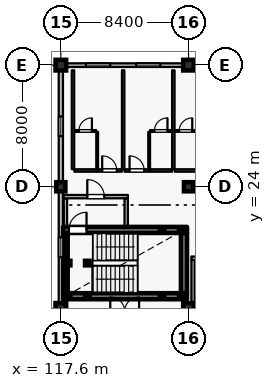
"""IFC4 building model, lengths in metres.
Left out: names, types, materials, properties, quantities, classifications, styles, units other than length and angle.
Written with IfcOpenShell. Run it as: python <this file> out.ifc"""

import sys

from ifc_helpers import new_model, si_unit, direction, frame, frame_2d, origin, origin_2d, place, context, subcontext, project, spatial, rectangle, hollow_rectangle, extrude, element, fill, save


model = new_model("IFC4")
c1 = context("Model", 3, precision=1e-05, world=origin(), true_north=direction((0.0, 1.0)))
c2 = subcontext(c1, "Body", "Model", "MODEL_VIEW")
j1 = project(units=[si_unit("LENGTHUNIT", "METRE"), si_unit("PLANEANGLEUNIT", "RADIAN")], contexts=[c1])
p1 = place(None, origin())
s1 = spatial("IfcSite", under=j1, at=p1, CompositionType="ELEMENT")
p2 = place(p1, origin())
s2 = spatial("IfcBuilding", under=s1, at=p2, CompositionType="ELEMENT")
p3 = place(p2, frame((0.0, 0.0, 32.4)))
s3 = spatial("IfcBuildingStorey", under=s2, at=p3, CompositionType="ELEMENT", Elevation=32.4)
for number, where, z_axis, x_axis in (
    (1, (117.6, 16.0, 0.0), (0.0, 0.0, 1.0), (1.0, 0.0, 0.0)),
    (2, (117.6, 32.0, 0.0), (0.0, 0.0, 1.0), (1.0, 0.0, 0.0)),
    (3, (126.0, 16.0, 0.0), (0.0, 0.0, 1.0), (1.0, 0.0, 0.0)),
    (4, (126.0, 32.0, 0.0), (0.0, 0.0, 1.0), (1.0, 0.0, 0.0)),
):
    element("IfcColumn", number, at=place(p3, frame(where, z_axis=z_axis, x_axis=x_axis)), inside=s3, PredefinedType="COLUMN", context=c2, shape_type="SweptSolid", body=[
        extrude(rectangle(XDim=0.7, YDim=0.7, at=origin_2d()), origin(), (0.0, 0.0, 1.0), 3.6),
    ])
for number, where, z_axis, x_axis in (
    (5, (117.6, 24.0, 0.0), (0.0, 0.0, 1.0), (1.0, 0.0, 0.0)),
    (6, (126.0, 24.0, 0.0), (0.0, 0.0, 1.0), (1.0, 0.0, 0.0)),
):
    element("IfcColumn", number, at=place(p3, frame(where, z_axis=z_axis, x_axis=x_axis)), inside=s3, PredefinedType="COLUMN", context=c2, shape_type="SweptSolid", body=[
        extrude(rectangle(XDim=0.6, YDim=0.6, at=origin_2d()), origin(), (0.0, 0.0, 1.0), 3.6),
    ])
p4 = place(p3, frame((117.95, 32.0, 0.0), z_axis=(0.0, 0.0, 1.0), x_axis=(1.0, 0.0, 0.0)))
e7 = element("IfcWall", 7, at=p4, inside=s3, PredefinedType="SOLIDWALL", context=c2, shape_type="SweptSolid", body=[
    extrude(rectangle(XDim=7.7, YDim=0.24, at=frame_2d((3.85, 0.0))), origin(), (0.0, 0.0, 1.0), 2.94),
])
p5 = place(p4, frame((1.3, 0.0, 0.8)))
e8 = element("IfcOpeningElement", 8, at=p5, cuts=e7, PredefinedType="OPENING", context=c2, shape_type="SweptSolid", body=[
    extrude(rectangle(XDim=1.6, YDim=1.6, at=frame_2d((0.8, 0.8))), frame((0.0, 0.13, 0.0), z_axis=(0.0, -1.0, 0.0), x_axis=(1.0, 0.0, 0.0)), (0.0, 0.0, 1.0), 0.26),
])
p6 = place(p4, frame((4.6, 0.0, 0.8)))
e9 = element("IfcOpeningElement", 9, at=p6, cuts=e7, PredefinedType="OPENING", context=c2, shape_type="SweptSolid", body=[
    extrude(rectangle(XDim=1.6, YDim=1.6, at=frame_2d((0.8, 0.8))), frame((0.0, 0.13, 0.0), z_axis=(0.0, -1.0, 0.0), x_axis=(1.0, 0.0, 0.0)), (0.0, 0.0, 1.0), 0.26),
])
p7 = place(p3, frame((126.35, 32.0, 0.0), z_axis=(0.0, 0.0, 1.0), x_axis=(1.0, 0.0, 0.0)))
e10 = element("IfcWall", 10, at=p7, inside=s3, PredefinedType="SOLIDWALL", context=c2, shape_type="SweptSolid", body=[
    extrude(rectangle(XDim=7.7, YDim=0.24, at=frame_2d((3.85, 0.0))), origin(), (0.0, 0.0, 1.0), 2.94),
])
p8 = place(p7, frame((0.125, 0.0, 0.8)))
e11 = element("IfcOpeningElement", 11, at=p8, cuts=e10, PredefinedType="OPENING", context=c2, shape_type="SweptSolid", body=[
    extrude(rectangle(XDim=1.6, YDim=1.6, at=frame_2d((0.8, 0.8))), frame((0.0, 0.13, 0.0), z_axis=(0.0, -1.0, 0.0), x_axis=(1.0, 0.0, 0.0)), (0.0, 0.0, 1.0), 0.26),
])
p9 = place(p7, frame((2.8, 0.0, 0.8)))
e12 = element("IfcOpeningElement", 12, at=p9, cuts=e10, PredefinedType="OPENING", context=c2, shape_type="SweptSolid", body=[
    extrude(rectangle(XDim=1.6, YDim=1.6, at=frame_2d((0.8, 0.8))), frame((0.0, 0.13, 0.0), z_axis=(0.0, -1.0, 0.0), x_axis=(1.0, 0.0, 0.0)), (0.0, 0.0, 1.0), 0.26),
])
p10 = place(p7, frame((5.725, 0.0, 0.8)))
e13 = element("IfcOpeningElement", 13, at=p10, cuts=e10, PredefinedType="OPENING", context=c2, shape_type="SweptSolid", body=[
    extrude(rectangle(XDim=1.6, YDim=1.6, at=frame_2d((0.8, 0.8))), frame((0.0, 0.13, 0.0), z_axis=(0.0, -1.0, 0.0), x_axis=(1.0, 0.0, 0.0)), (0.0, 0.0, 1.0), 0.26),
])
p11 = place(p3, frame((117.6, 16.35, 0.0), z_axis=(0.0, 0.0, 1.0), x_axis=(0.0, 1.0, 0.0)))
e14 = element("IfcWall", 14, at=p11, inside=s3, PredefinedType="SOLIDWALL", context=c2, shape_type="SweptSolid", body=[
    extrude(rectangle(XDim=7.35, YDim=0.28, at=frame_2d((3.675, 0.0))), origin(), (0.0, 0.0, 1.0), 2.7),
])
p12 = place(p11, frame((3.025, 0.0, 0.5)))
e15 = element("IfcOpeningElement", 15, at=p12, cuts=e14, PredefinedType="OPENING", context=c2, shape_type="SweptSolid", body=[
    extrude(rectangle(XDim=1.3, YDim=1.65, at=frame_2d((0.65, 0.825))), frame((0.0, 0.15, 0.0), z_axis=(0.0, -1.0, 0.0), x_axis=(1.0, 0.0, 0.0)), (0.0, 0.0, 1.0), 0.3),
])
p13 = place(p3, frame((117.6, 24.3, 0.0), z_axis=(0.0, 0.0, 1.0), x_axis=(0.0, 1.0, 0.0)))
e16 = element("IfcWall", 16, at=p13, inside=s3, PredefinedType="SOLIDWALL", context=c2, shape_type="SweptSolid", body=[
    extrude(rectangle(XDim=7.35, YDim=0.28, at=frame_2d((3.675, 0.0))), origin(), (0.0, 0.0, 1.0), 2.7),
])
p14 = place(p13, frame((3.025, 0.0, 0.5)))
e17 = element("IfcOpeningElement", 17, at=p14, cuts=e16, PredefinedType="OPENING", context=c2, shape_type="SweptSolid", body=[
    extrude(rectangle(XDim=1.3, YDim=1.65, at=frame_2d((0.65, 0.825))), frame((0.0, 0.15, 0.0), z_axis=(0.0, -1.0, 0.0), x_axis=(1.0, 0.0, 0.0)), (0.0, 0.0, 1.0), 0.3),
])
p15 = place(p3, frame((126.3, 13.365, 0.0), z_axis=(0.0, 0.0, 1.0), x_axis=(0.0, 1.0, 0.0)))
e18 = element("IfcWall", 18, at=p15, inside=s3, PredefinedType="PARTITIONING", context=c2, shape_type="SweptSolid", body=[
    extrude(rectangle(XDim=5.82, YDim=0.22, at=frame_2d((2.91, 0.0))), origin(), (0.0, 0.0, 1.0), 3.335),
])
p16 = place(p3, frame((126.19, 19.3, 0.0), z_axis=(0.0, 0.0, 1.0), x_axis=(1.0, 0.0, 0.0)))
e19 = element("IfcWall", 19, at=p16, inside=s3, PredefinedType="PARTITIONING", context=c2, shape_type="SweptSolid", body=[
    extrude(rectangle(XDim=3.82, YDim=0.22, at=frame_2d((1.91, 0.0))), origin(), (0.0, 0.0, 1.0), 3.335),
])
p17 = place(p16, frame((1.35, 0.0, 0.0)))
e20 = element("IfcOpeningElement", 20, at=p17, cuts=e19, PredefinedType="OPENING", context=c2, shape_type="SweptSolid", body=[
    extrude(rectangle(XDim=1.12, YDim=2.2, at=frame_2d((0.56, 1.1))), frame((0.0, 0.12, 0.0), z_axis=(0.0, -1.0, 0.0), x_axis=(1.0, 0.0, 0.0)), (0.0, 0.0, 1.0), 0.24),
])
p18 = place(p3, frame((117.75, 16.8, 0.0), z_axis=(0.0, 0.0, 1.0), x_axis=(1.0, 0.0, 0.0)))
e21 = element("IfcWall", 21, at=p18, inside=s3, PredefinedType="SHEAR", context=c2, shape_type="SweptSolid", body=[
    extrude(rectangle(XDim=8.15, YDim=0.4, at=frame_2d((4.075, 0.0))), origin(), (0.0, 0.0, 1.0), 3.335),
])
p19 = place(p3, frame((125.7, 17.005, 0.0), z_axis=(0.0, 0.0, 1.0), x_axis=(0.0, 1.0, 0.0)))
e22 = element("IfcWall", 22, at=p19, inside=s3, PredefinedType="SHEAR", context=c2, shape_type="SweptSolid", body=[
    extrude(rectangle(XDim=3.95, YDim=0.4, at=frame_2d((1.975, 0.0))), origin(), (0.0, 0.0, 1.0), 3.335),
])
p20 = place(p3, frame((117.75, 21.16, 0.0), z_axis=(0.0, 0.0, 1.0), x_axis=(1.0, 0.0, 0.0)))
e23 = element("IfcWall", 23, at=p20, inside=s3, PredefinedType="SHEAR", context=c2, shape_type="SweptSolid", body=[
    extrude(rectangle(XDim=8.15, YDim=0.4, at=frame_2d((4.075, 0.0))), origin(), (0.0, 0.0, 1.0), 3.335),
])
p21 = place(p20, frame((0.38, 0.0, 0.0)))
e24 = element("IfcOpeningElement", 24, at=p21, cuts=e23, PredefinedType="OPENING", context=c2, shape_type="SweptSolid", body=[
    extrude(rectangle(XDim=1.16, YDim=2.2, at=frame_2d((0.58, 1.1))), frame((0.0, 0.21, 0.0), z_axis=(0.0, -1.0, 0.0), x_axis=(1.0, 0.0, 0.0)), (0.0, 0.0, 1.0), 0.42),
])
p22 = place(p3, frame((117.9, 17.005, 0.0), z_axis=(0.0, 0.0, 1.0), x_axis=(0.0, 1.0, 0.0)))
e25 = element("IfcWall", 25, at=p22, inside=s3, PredefinedType="SHEAR", context=c2, shape_type="SweptSolid", body=[
    extrude(rectangle(XDim=3.95, YDim=0.3, at=frame_2d((1.975, 0.0))), origin(), (0.0, 0.0, 1.0), 3.335),
])
p23 = place(p3, frame((117.9, 21.365, 0.0), z_axis=(0.0, 0.0, 1.0), x_axis=(0.0, 1.0, 0.0)))
e26 = element("IfcWall", 26, at=p23, inside=s3, PredefinedType="PARTITIONING", context=c2, shape_type="SweptSolid", body=[
    extrude(rectangle(XDim=1.87, YDim=0.22, at=frame_2d((0.935, 0.0))), origin(), (0.0, 0.0, 1.0), 3.335),
])
p24 = place(p3, frame((117.79, 23.35, 0.0), z_axis=(0.0, 0.0, 1.0), x_axis=(1.0, 0.0, 0.0)))
e27 = element("IfcWall", 27, at=p24, inside=s3, PredefinedType="PARTITIONING", context=c2, shape_type="SweptSolid", body=[
    extrude(rectangle(XDim=4.22, YDim=0.22, at=frame_2d((2.11, 0.0))), origin(), (0.0, 0.0, 1.0), 3.335),
])
p25 = place(p24, frame((1.55, 0.0, 0.0)))
e28 = element("IfcOpeningElement", 28, at=p25, cuts=e27, PredefinedType="OPENING", context=c2, shape_type="SweptSolid", body=[
    extrude(rectangle(XDim=1.12, YDim=2.2, at=frame_2d((0.56, 1.1))), frame((0.0, 0.12, 0.0), z_axis=(0.0, -1.0, 0.0), x_axis=(1.0, 0.0, 0.0)), (0.0, 0.0, 1.0), 0.24),
])
p26 = place(p3, frame((121.9, 21.365, 0.0), z_axis=(0.0, 0.0, 1.0), x_axis=(0.0, 1.0, 0.0)))
e29 = element("IfcWall", 29, at=p26, inside=s3, PredefinedType="PARTITIONING", context=c2, shape_type="SweptSolid", body=[
    extrude(rectangle(XDim=1.87, YDim=0.22, at=frame_2d((0.935, 0.0))), origin(), (0.0, 0.0, 1.0), 3.335),
])
for number, where, z_axis, x_axis in (
    (30, (118.08, 16.8, 0.0), (0.0, 0.0, 1.0), (1.0, 0.0, 0.0)),
    (31, (118.08, 18.98, 0.0), (0.0, 0.0, 1.0), (1.0, 0.0, 0.0)),
    (32, (119.34, 16.8, 0.0), (0.0, 0.0, 1.0), (1.0, 0.0, 0.0)),
    (33, (119.34, 18.98, 0.0), (0.0, 0.0, 1.0), (1.0, 0.0, 0.0)),
):
    element("IfcColumn", number, at=place(p3, frame(where, z_axis=z_axis, x_axis=x_axis)), inside=s3, PredefinedType="COLUMN", context=c2, shape_type="SweptSolid", body=[
        extrude(hollow_rectangle(XDim=0.3, YDim=0.3, WallThickness=0.012, at=origin_2d()), origin(), (0.0, 0.0, 1.0), 3.42),
    ])
for number, where, z_axis, x_axis in (
    (34, (124.26, 16.8, -1.8), (0.0, 0.0, 1.0), (1.0, 0.0, 0.0)),
    (35, (124.26, 21.16, -1.8), (0.0, 0.0, 1.0), (1.0, 0.0, 0.0)),
    (36, (125.52, 16.8, -1.8), (0.0, 0.0, 1.0), (1.0, 0.0, 0.0)),
    (37, (125.52, 21.16, -1.8), (0.0, 0.0, 1.0), (1.0, 0.0, 0.0)),
):
    element("IfcColumn", number, at=place(p3, frame(where, z_axis=z_axis, x_axis=x_axis)), inside=s3, PredefinedType="COLUMN", context=c2, shape_type="SweptSolid", body=[
        extrude(hollow_rectangle(XDim=0.3, YDim=0.3, WallThickness=0.012, at=origin_2d()), origin(), (0.0, 0.0, 1.0), 3.42),
    ])
p27 = place(p3, frame((118.49, 25.07, 0.0), z_axis=(0.0, 0.0, 1.0), x_axis=(1.0, 0.0, 0.0)))
e38 = element("IfcWall", 38, at=p27, inside=s3, PredefinedType="PARTITIONING", context=c2, shape_type="SweptSolid", body=[
    extrude(rectangle(XDim=1.49, YDim=0.16, at=frame_2d((0.745, 0.0))), origin(), (0.0, 0.0, 1.0), 3.335),
])
p28 = place(p3, frame((119.99, 25.07, 0.0), z_axis=(0.0, 0.0, 1.0), x_axis=(1.0, 0.0, 0.0)))
e39 = element("IfcWall", 39, at=p28, inside=s3, PredefinedType="PARTITIONING", context=c2, shape_type="SweptSolid", body=[
    extrude(rectangle(XDim=1.62, YDim=0.16, at=frame_2d((0.81, 0.0))), origin(), (0.0, 0.0, 1.0), 3.335),
])
p29 = place(p28, frame((0.33, 0.0, 0.0)))
e40 = element("IfcOpeningElement", 40, at=p29, cuts=e39, PredefinedType="OPENING", context=c2, shape_type="SweptSolid", body=[
    extrude(rectangle(XDim=0.96, YDim=2.2, at=frame_2d((0.48, 1.1))), frame((0.0, 0.09, 0.0), z_axis=(0.0, -1.0, 0.0), x_axis=(1.0, 0.0, 0.0)), (0.0, 0.0, 1.0), 0.18),
])
p30 = place(p3, frame((119.99, 25.16, 0.0), z_axis=(0.0, 0.0, 1.0), x_axis=(0.0, 1.0, 0.0)))
e41 = element("IfcWall", 41, at=p30, inside=s3, PredefinedType="PARTITIONING", context=c2, shape_type="SweptSolid", body=[
    extrude(rectangle(XDim=2.45, YDim=0.115, at=frame_2d((1.225, 0.0))), origin(), (0.0, 0.0, 1.0), 3.335),
])
p31 = place(p3, frame((118.5, 27.67, 0.0), z_axis=(0.0, 0.0, 1.0), x_axis=(1.0, 0.0, 0.0)))
e42 = element("IfcWall", 42, at=p31, inside=s3, PredefinedType="PARTITIONING", context=c2, shape_type="SweptSolid", body=[
    extrude(rectangle(XDim=1.43, YDim=0.115, at=frame_2d((0.715, 0.0))), origin(), (0.0, 0.0, 1.0), 3.335),
])
p32 = place(p31, frame((0.285, 0.0, 0.0)))
e43 = element("IfcOpeningElement", 43, at=p32, cuts=e42, PredefinedType="OPENING", context=c2, shape_type="SweptSolid", body=[
    extrude(rectangle(XDim=0.86, YDim=2.12, at=frame_2d((0.43, 1.06))), frame((0.0, 0.067, 0.0), z_axis=(0.0, -1.0, 0.0), x_axis=(1.0, 0.0, 0.0)), (0.0, 0.0, 1.0), 0.135),
])
p33 = place(p3, frame((118.4, 25.16, 0.0), z_axis=(0.0, 0.0, 1.0), x_axis=(0.0, 1.0, 0.0)))
e44 = element("IfcWall", 44, at=p33, inside=s3, PredefinedType="PARTITIONING", context=c2, shape_type="SweptSolid", body=[
    extrude(rectangle(XDim=6.5, YDim=0.16, at=frame_2d((3.25, 0.0))), origin(), (0.0, 0.0, 1.0), 3.335),
])
p34 = place(p3, frame((121.79, 25.07, 0.0), z_axis=(0.0, 0.0, 1.0), x_axis=(1.0, 0.0, 0.0)))
e45 = element("IfcWall", 45, at=p34, inside=s3, PredefinedType="PARTITIONING", context=c2, shape_type="SweptSolid", body=[
    extrude(rectangle(XDim=1.62, YDim=0.16, at=frame_2d((0.81, 0.0))), origin(), (0.0, 0.0, 1.0), 3.335),
])
p35 = place(p34, frame((0.33, 0.0, 0.0)))
e46 = element("IfcOpeningElement", 46, at=p35, cuts=e45, PredefinedType="OPENING", context=c2, shape_type="SweptSolid", body=[
    extrude(rectangle(XDim=0.96, YDim=2.2, at=frame_2d((0.48, 1.1))), frame((0.0, 0.09, 0.0), z_axis=(0.0, -1.0, 0.0), x_axis=(1.0, 0.0, 0.0)), (0.0, 0.0, 1.0), 0.18),
])
p36 = place(p3, frame((123.42, 25.07, 0.0), z_axis=(0.0, 0.0, 1.0), x_axis=(1.0, 0.0, 0.0)))
e47 = element("IfcWall", 47, at=p36, inside=s3, PredefinedType="PARTITIONING", context=c2, shape_type="SweptSolid", body=[
    extrude(rectangle(XDim=1.49, YDim=0.16, at=frame_2d((0.745, 0.0))), origin(), (0.0, 0.0, 1.0), 3.335),
])
p37 = place(p3, frame((123.41, 25.16, 0.0), z_axis=(0.0, 0.0, 1.0), x_axis=(0.0, 1.0, 0.0)))
e48 = element("IfcWall", 48, at=p37, inside=s3, PredefinedType="PARTITIONING", context=c2, shape_type="SweptSolid", body=[
    extrude(rectangle(XDim=2.45, YDim=0.115, at=frame_2d((1.225, 0.0))), origin(), (0.0, 0.0, 1.0), 3.335),
])
p38 = place(p3, frame((123.47, 27.67, 0.0), z_axis=(0.0, 0.0, 1.0), x_axis=(1.0, 0.0, 0.0)))
e49 = element("IfcWall", 49, at=p38, inside=s3, PredefinedType="PARTITIONING", context=c2, shape_type="SweptSolid", body=[
    extrude(rectangle(XDim=1.43, YDim=0.115, at=frame_2d((0.715, 0.0))), origin(), (0.0, 0.0, 1.0), 3.335),
])
p39 = place(p38, frame((0.285, 0.0, 0.0)))
e50 = element("IfcOpeningElement", 50, at=p39, cuts=e49, PredefinedType="OPENING", context=c2, shape_type="SweptSolid", body=[
    extrude(rectangle(XDim=0.86, YDim=2.12, at=frame_2d((0.43, 1.06))), frame((0.0, 0.067, 0.0), z_axis=(0.0, -1.0, 0.0), x_axis=(1.0, 0.0, 0.0)), (0.0, 0.0, 1.0), 0.135),
])
p40 = place(p3, frame((121.7, 25.16, 0.0), z_axis=(0.0, 0.0, 1.0), x_axis=(0.0, 1.0, 0.0)))
e51 = element("IfcWall", 51, at=p40, inside=s3, PredefinedType="PARTITIONING", context=c2, shape_type="SweptSolid", body=[
    extrude(rectangle(XDim=6.5, YDim=0.16, at=frame_2d((3.25, 0.0))), origin(), (0.0, 0.0, 1.0), 3.335),
])
p41 = place(p3, frame((125.09, 25.07, 0.0), z_axis=(0.0, 0.0, 1.0), x_axis=(1.0, 0.0, 0.0)))
e52 = element("IfcWall", 52, at=p41, inside=s3, PredefinedType="PARTITIONING", context=c2, shape_type="SweptSolid", body=[
    extrude(rectangle(XDim=1.49, YDim=0.16, at=frame_2d((0.745, 0.0))), origin(), (0.0, 0.0, 1.0), 3.335),
])
p42 = place(p3, frame((125.1, 27.67, 0.0), z_axis=(0.0, 0.0, 1.0), x_axis=(1.0, 0.0, 0.0)))
e53 = element("IfcWall", 53, at=p42, inside=s3, PredefinedType="PARTITIONING", context=c2, shape_type="SweptSolid", body=[
    extrude(rectangle(XDim=1.43, YDim=0.115, at=frame_2d((0.715, 0.0))), origin(), (0.0, 0.0, 1.0), 3.335),
])
p43 = place(p42, frame((0.285, 0.0, 0.0)))
e54 = element("IfcOpeningElement", 54, at=p43, cuts=e53, PredefinedType="OPENING", context=c2, shape_type="SweptSolid", body=[
    extrude(rectangle(XDim=0.86, YDim=2.12, at=frame_2d((0.43, 1.06))), frame((0.0, 0.067, 0.0), z_axis=(0.0, -1.0, 0.0), x_axis=(1.0, 0.0, 0.0)), (0.0, 0.0, 1.0), 0.135),
])
p44 = place(p3, frame((125.0, 25.16, 0.0), z_axis=(0.0, 0.0, 1.0), x_axis=(0.0, 1.0, 0.0)))
e55 = element("IfcWall", 55, at=p44, inside=s3, PredefinedType="PARTITIONING", context=c2, shape_type="SweptSolid", body=[
    extrude(rectangle(XDim=6.5, YDim=0.16, at=frame_2d((3.25, 0.0))), origin(), (0.0, 0.0, 1.0), 3.335),
])
p45 = place(p5, origin())
e56 = element("IfcWindow", 56, at=p45, inside=s3, PartitioningType="SINGLE_PANEL", PredefinedType="WINDOW", context=c2, shape_type="SweptSolid", body=[
    extrude(rectangle(XDim=1.6, YDim=1.6, at=frame_2d((0.8, 0.8))), frame((0.0, 0.03, 0.0), z_axis=(0.0, -1.0, 0.0), x_axis=(1.0, 0.0, 0.0)), (0.0, 0.0, 1.0), 0.06),
])
fill(e8, e56)
p46 = place(p6, origin())
e57 = element("IfcWindow", 57, at=p46, inside=s3, PartitioningType="SINGLE_PANEL", PredefinedType="WINDOW", context=c2, shape_type="SweptSolid", body=[
    extrude(rectangle(XDim=1.6, YDim=1.6, at=frame_2d((0.8, 0.8))), frame((0.0, 0.03, 0.0), z_axis=(0.0, -1.0, 0.0), x_axis=(1.0, 0.0, 0.0)), (0.0, 0.0, 1.0), 0.06),
])
fill(e9, e57)
p47 = place(p8, origin())
e58 = element("IfcWindow", 58, at=p47, inside=s3, PartitioningType="SINGLE_PANEL", PredefinedType="WINDOW", context=c2, shape_type="SweptSolid", body=[
    extrude(rectangle(XDim=1.6, YDim=1.6, at=frame_2d((0.8, 0.8))), frame((0.0, 0.03, 0.0), z_axis=(0.0, -1.0, 0.0), x_axis=(1.0, 0.0, 0.0)), (0.0, 0.0, 1.0), 0.06),
])
fill(e11, e58)
p48 = place(p12, origin())
e59 = element("IfcWindow", 59, at=p48, inside=s3, PartitioningType="SINGLE_PANEL", PredefinedType="WINDOW", context=c2, shape_type="SweptSolid", body=[
    extrude(rectangle(XDim=1.3, YDim=1.65, at=frame_2d((0.65, 0.825))), frame((0.0, 0.03, 0.0), z_axis=(0.0, -1.0, 0.0), x_axis=(1.0, 0.0, 0.0)), (0.0, 0.0, 1.0), 0.06),
])
fill(e15, e59)
p49 = place(p14, origin())
e60 = element("IfcWindow", 60, at=p49, inside=s3, PartitioningType="SINGLE_PANEL", PredefinedType="WINDOW", context=c2, shape_type="SweptSolid", body=[
    extrude(rectangle(XDim=1.3, YDim=1.65, at=frame_2d((0.65, 0.825))), frame((0.0, 0.03, 0.0), z_axis=(0.0, -1.0, 0.0), x_axis=(1.0, 0.0, 0.0)), (0.0, 0.0, 1.0), 0.06),
])
fill(e17, e60)
p50 = place(p21, origin())
e61 = element("IfcDoor", 61, at=p50, inside=s3, OperationType="SINGLE_SWING_RIGHT", PredefinedType="DOOR", context=c2, shape_type="SweptSolid", body=[
    extrude(rectangle(XDim=1.16, YDim=2.2, at=frame_2d((0.58, 1.1))), frame((0.0, 0.025, 0.0), z_axis=(0.0, -1.0, 0.0), x_axis=(1.0, 0.0, 0.0)), (0.0, 0.0, 1.0), 0.05),
])
fill(e24, e61)
p51 = place(p25, origin())
e62 = element("IfcDoor", 62, at=p51, inside=s3, OperationType="SINGLE_SWING_LEFT", PredefinedType="DOOR", context=c2, shape_type="SweptSolid", body=[
    extrude(rectangle(XDim=1.12, YDim=2.2, at=frame_2d((0.56, 1.1))), frame((0.0, 0.025, 0.0), z_axis=(0.0, -1.0, 0.0), x_axis=(1.0, 0.0, 0.0)), (0.0, 0.0, 1.0), 0.05),
])
fill(e28, e62)
p52 = place(p29, origin())
e63 = element("IfcDoor", 63, at=p52, inside=s3, OperationType="SINGLE_SWING_LEFT", PredefinedType="DOOR", context=c2, shape_type="SweptSolid", body=[
    extrude(rectangle(XDim=0.96, YDim=2.2, at=frame_2d((0.48, 1.1))), frame((0.0, 0.025, 0.0), z_axis=(0.0, -1.0, 0.0), x_axis=(1.0, 0.0, 0.0)), (0.0, 0.0, 1.0), 0.05),
])
fill(e40, e63)
p53 = place(p32, origin())
e64 = element("IfcDoor", 64, at=p53, inside=s3, OperationType="SINGLE_SWING_RIGHT", PredefinedType="DOOR", context=c2, shape_type="SweptSolid", body=[
    extrude(rectangle(XDim=0.86, YDim=2.12, at=frame_2d((0.43, 1.06))), frame((0.0, 0.025, 0.0), z_axis=(0.0, -1.0, 0.0), x_axis=(1.0, 0.0, 0.0)), (0.0, 0.0, 1.0), 0.05),
])
fill(e43, e64)
p54 = place(p35, origin())
e65 = element("IfcDoor", 65, at=p54, inside=s3, OperationType="SINGLE_SWING_LEFT", PredefinedType="DOOR", context=c2, shape_type="SweptSolid", body=[
    extrude(rectangle(XDim=0.96, YDim=2.2, at=frame_2d((0.48, 1.1))), frame((0.0, 0.025, 0.0), z_axis=(0.0, -1.0, 0.0), x_axis=(1.0, 0.0, 0.0)), (0.0, 0.0, 1.0), 0.05),
])
fill(e46, e65)
p55 = place(p39, origin())
e66 = element("IfcDoor", 66, at=p55, inside=s3, OperationType="SINGLE_SWING_RIGHT", PredefinedType="DOOR", context=c2, shape_type="SweptSolid", body=[
    extrude(rectangle(XDim=0.86, YDim=2.12, at=frame_2d((0.43, 1.06))), frame((0.0, 0.025, 0.0), z_axis=(0.0, -1.0, 0.0), x_axis=(1.0, 0.0, 0.0)), (0.0, 0.0, 1.0), 0.05),
])
fill(e50, e66)
p56 = place(p43, origin())
e67 = element("IfcDoor", 67, at=p56, inside=s3, OperationType="SINGLE_SWING_RIGHT", PredefinedType="DOOR", context=c2, shape_type="SweptSolid", body=[
    extrude(rectangle(XDim=0.86, YDim=2.12, at=frame_2d((0.43, 1.06))), frame((0.0, 0.025, 0.0), z_axis=(0.0, -1.0, 0.0), x_axis=(1.0, 0.0, 0.0)), (0.0, 0.0, 1.0), 0.05),
])
fill(e54, e67)
save(model, sys.argv[1])
